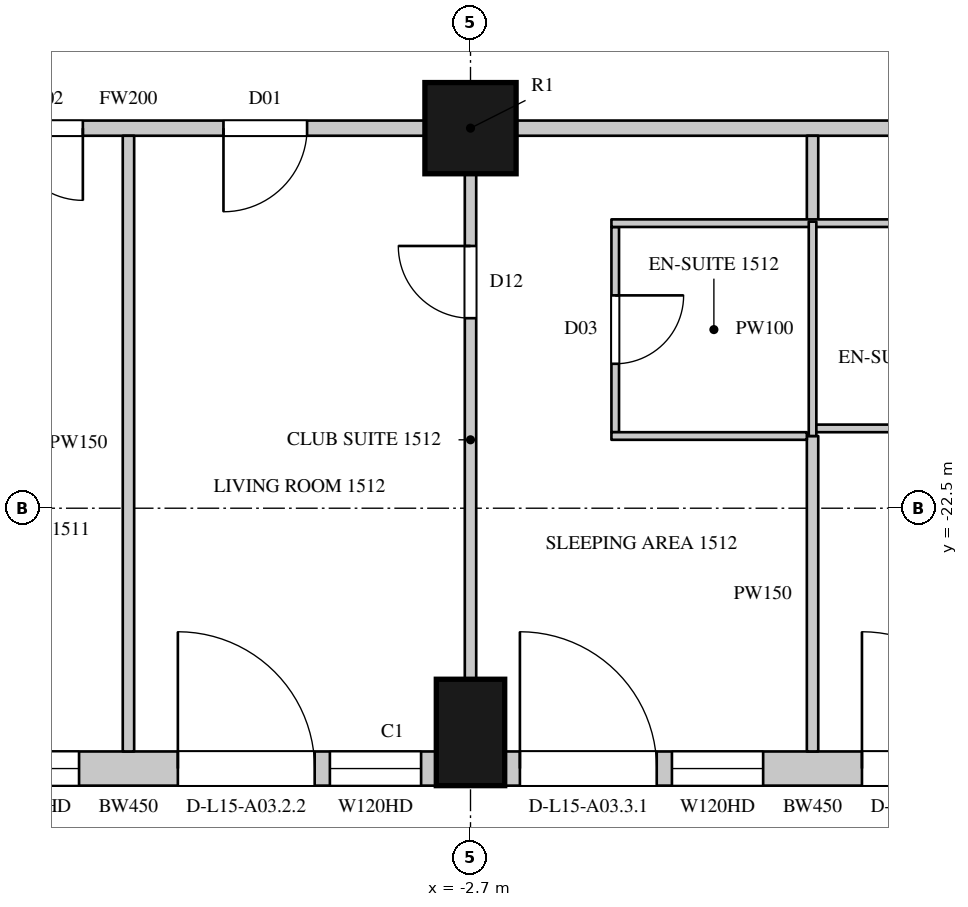
"""IFC4 building model, lengths in metres.
Left out: names, types, materials, properties, quantities, classifications, styles, units other than length and angle.
Written with IfcOpenShell. Run it as: python <this file> out.ifc"""

import sys

from ifc_helpers import new_model, si_unit, direction, frame, frame_2d, origin, origin_2d, place, context, subcontext, project, spatial, rectangle, circle, extrude, element, fill, save


model = new_model("IFC4")
c1 = context("Model", 3, precision=1e-05, world=origin(), true_north=direction((0.0, 1.0)))
c2 = subcontext(c1, "Body", "Model", "MODEL_VIEW")
j1 = project(units=[si_unit("LENGTHUNIT", "METRE"), si_unit("PLANEANGLEUNIT", "RADIAN")], contexts=[c1])
p1 = place(None, origin())
s1 = spatial("IfcSite", under=j1, at=p1, CompositionType="ELEMENT")
p2 = place(p1, origin())
s2 = spatial("IfcBuilding", under=s1, at=p2, CompositionType="ELEMENT")
p3 = place(p2, frame((0.0, 0.0, 84.3)))
s3 = spatial("IfcBuildingStorey", under=s2, at=p3, CompositionType="ELEMENT", Elevation=84.3)
p4 = place(p3, frame((-2.7, -25.45, 0.0), z_axis=(0.0, 0.0, 1.0), x_axis=(1.0, 0.0, 0.0)))
e1 = element("IfcColumn", 1, at=p4, inside=s3, PredefinedType="COLUMN", context=c2, shape_type="SweptSolid", body=[
    extrude(rectangle(XDim=0.9, YDim=1.4, at=origin_2d()), origin(), (0.0, 0.0, 1.0), 3.6),
])
p5 = place(p3, frame((-2.7, -17.5, 0.0), z_axis=(0.0, 0.0, 1.0), x_axis=(1.0, 0.0, 0.0)))
e2 = element("IfcColumn", 2, at=p5, inside=s3, PredefinedType="COLUMN", context=c2, shape_type="SweptSolid", body=[
    extrude(circle(Radius=0.6, at=origin_2d()), origin(), (0.0, 0.0, 1.0), 3.6),
])
p6 = place(p3, frame((-11.25, -25.925, 0.0), z_axis=(0.0, 0.0, 1.0), x_axis=(1.0, 0.0, 0.0)))
e3 = element("IfcWall", 3, at=p6, inside=s3, PredefinedType="SOLIDWALL", context=c2, shape_type="SweptSolid", body=[
    extrude(rectangle(XDim=8.1, YDim=0.45, at=frame_2d((4.05, 0.0))), origin(), (0.0, 0.0, 1.0), 3.3),
])
p7 = place(p6, frame((0.2, 0.0, 0.0)))
e4 = element("IfcOpeningElement", 4, at=p7, cuts=e3, PredefinedType="OPENING", context=c2, shape_type="SweptSolid", body=[
    extrude(rectangle(XDim=1.8, YDim=2.4, at=frame_2d((0.9, 1.2))), frame((0.0, 0.235, 0.0), z_axis=(0.0, -1.0, 0.0), x_axis=(1.0, 0.0, 0.0)), (0.0, 0.0, 1.0), 0.47),
])
p8 = place(p6, frame((2.2, 0.0, 1.05)))
e5 = element("IfcOpeningElement", 5, at=p8, cuts=e3, PredefinedType="OPENING", context=c2, shape_type="SweptSolid", body=[
    extrude(rectangle(XDim=1.2, YDim=2.0, at=frame_2d((0.6, 1.0))), frame((0.0, 0.235, 0.0), z_axis=(0.0, -1.0, 0.0), x_axis=(1.0, 0.0, 0.0)), (0.0, 0.0, 1.0), 0.47),
])
p9 = place(p6, frame((4.7, 0.0, 0.0)))
e6 = element("IfcOpeningElement", 6, at=p9, cuts=e3, PredefinedType="OPENING", context=c2, shape_type="SweptSolid", body=[
    extrude(rectangle(XDim=1.8, YDim=2.4, at=frame_2d((0.9, 1.2))), frame((0.0, 0.235, 0.0), z_axis=(0.0, -1.0, 0.0), x_axis=(1.0, 0.0, 0.0)), (0.0, 0.0, 1.0), 0.47),
])
p10 = place(p6, frame((6.7, 0.0, 1.05)))
e7 = element("IfcOpeningElement", 7, at=p10, cuts=e3, PredefinedType="OPENING", context=c2, shape_type="SweptSolid", body=[
    extrude(rectangle(XDim=1.2, YDim=2.0, at=frame_2d((0.6, 1.0))), frame((0.0, 0.235, 0.0), z_axis=(0.0, -1.0, 0.0), x_axis=(1.0, 0.0, 0.0)), (0.0, 0.0, 1.0), 0.47),
])
p11 = place(p3, frame((-2.25, -25.925, 0.0), z_axis=(0.0, 0.0, 1.0), x_axis=(1.0, 0.0, 0.0)))
e8 = element("IfcWall", 8, at=p11, inside=s3, PredefinedType="SOLIDWALL", context=c2, shape_type="SweptSolid", body=[
    extrude(rectangle(XDim=8.1, YDim=0.45, at=frame_2d((4.05, 0.0))), origin(), (0.0, 0.0, 1.0), 3.3),
])
p12 = place(p11, frame((0.2, 0.0, 0.0)))
e9 = element("IfcOpeningElement", 9, at=p12, cuts=e8, PredefinedType="OPENING", context=c2, shape_type="SweptSolid", body=[
    extrude(rectangle(XDim=1.8, YDim=2.4, at=frame_2d((0.9, 1.2))), frame((0.0, 0.235, 0.0), z_axis=(0.0, -1.0, 0.0), x_axis=(1.0, 0.0, 0.0)), (0.0, 0.0, 1.0), 0.47),
])
p13 = place(p11, frame((2.2, 0.0, 1.05)))
e10 = element("IfcOpeningElement", 10, at=p13, cuts=e8, PredefinedType="OPENING", context=c2, shape_type="SweptSolid", body=[
    extrude(rectangle(XDim=1.2, YDim=2.0, at=frame_2d((0.6, 1.0))), frame((0.0, 0.235, 0.0), z_axis=(0.0, -1.0, 0.0), x_axis=(1.0, 0.0, 0.0)), (0.0, 0.0, 1.0), 0.47),
])
p14 = place(p11, frame((4.7, 0.0, 0.0)))
e11 = element("IfcOpeningElement", 11, at=p14, cuts=e8, PredefinedType="OPENING", context=c2, shape_type="SweptSolid", body=[
    extrude(rectangle(XDim=1.8, YDim=2.4, at=frame_2d((0.9, 1.2))), frame((0.0, 0.235, 0.0), z_axis=(0.0, -1.0, 0.0), x_axis=(1.0, 0.0, 0.0)), (0.0, 0.0, 1.0), 0.47),
])
p15 = place(p11, frame((6.7, 0.0, 1.05)))
e12 = element("IfcOpeningElement", 12, at=p15, cuts=e8, PredefinedType="OPENING", context=c2, shape_type="SweptSolid", body=[
    extrude(rectangle(XDim=1.2, YDim=2.0, at=frame_2d((0.6, 1.0))), frame((0.0, 0.235, 0.0), z_axis=(0.0, -1.0, 0.0), x_axis=(1.0, 0.0, 0.0)), (0.0, 0.0, 1.0), 0.47),
])
p16 = place(p3, frame((-11.1, -17.5, 0.0), z_axis=(0.0, 0.0, 1.0), x_axis=(1.0, 0.0, 0.0)))
e13 = element("IfcWall", 13, at=p16, inside=s3, PredefinedType="PARTITIONING", context=c2, shape_type="SweptSolid", body=[
    extrude(rectangle(XDim=7.8, YDim=0.2, at=frame_2d((3.9, 0.0))), origin(), (0.0, 0.0, 1.0), 2.75),
])
p17 = place(p16, frame((2.35, 0.0, 0.0)))
e14 = element("IfcOpeningElement", 14, at=p17, cuts=e13, PredefinedType="OPENING", context=c2, shape_type="SweptSolid", body=[
    extrude(rectangle(XDim=0.95, YDim=2.2, at=frame_2d((0.475, 1.1))), frame((0.0, 0.11, 0.0), z_axis=(0.0, -1.0, 0.0), x_axis=(1.0, 0.0, 0.0)), (0.0, 0.0, 1.0), 0.22),
])
p18 = place(p16, frame((5.15, 0.0, 0.0)))
e15 = element("IfcOpeningElement", 15, at=p18, cuts=e13, PredefinedType="OPENING", context=c2, shape_type="SweptSolid", body=[
    extrude(rectangle(XDim=1.1, YDim=2.4, at=frame_2d((0.55, 1.2))), frame((0.0, 0.11, 0.0), z_axis=(0.0, -1.0, 0.0), x_axis=(1.0, 0.0, 0.0)), (0.0, 0.0, 1.0), 0.22),
])
p19 = place(p3, frame((-2.1, -17.5, 0.0), z_axis=(0.0, 0.0, 1.0), x_axis=(1.0, 0.0, 0.0)))
e16 = element("IfcWall", 16, at=p19, inside=s3, PredefinedType="PARTITIONING", context=c2, shape_type="SweptSolid", body=[
    extrude(rectangle(XDim=7.8, YDim=0.2, at=frame_2d((3.9, 0.0))), origin(), (0.0, 0.0, 1.0), 2.75),
])
p20 = place(p19, frame((6.55, 0.0, 0.0)))
e17 = element("IfcOpeningElement", 17, at=p20, cuts=e16, PredefinedType="OPENING", context=c2, shape_type="SweptSolid", body=[
    extrude(rectangle(XDim=0.95, YDim=2.2, at=frame_2d((0.475, 1.1))), frame((0.0, 0.11, 0.0), z_axis=(0.0, -1.0, 0.0), x_axis=(1.0, 0.0, 0.0)), (0.0, 0.0, 1.0), 0.22),
])
p21 = place(p3, frame((-7.2, -25.7, 0.0), z_axis=(0.0, 0.0, 1.0), x_axis=(0.0, 1.0, 0.0)))
e18 = element("IfcWall", 18, at=p21, inside=s3, PredefinedType="PARTITIONING", context=c2, shape_type="SweptSolid", body=[
    extrude(rectangle(XDim=8.1, YDim=0.15, at=frame_2d((4.05, 0.0))), origin(), (0.0, 0.0, 1.0), 2.65),
])
p22 = place(p3, frame((-2.7, -24.75, 0.0), z_axis=(0.0, 0.0, 1.0), x_axis=(0.0, 1.0, 0.0)))
e19 = element("IfcWall", 19, at=p22, inside=s3, PredefinedType="PARTITIONING", context=c2, shape_type="SweptSolid", body=[
    extrude(rectangle(XDim=6.65, YDim=0.15, at=frame_2d((3.325, 0.0))), origin(), (0.0, 0.0, 1.0), 2.75),
])
p23 = place(p22, frame((4.75, 0.0, 0.0)))
e20 = element("IfcOpeningElement", 20, at=p23, cuts=e19, PredefinedType="OPENING", context=c2, shape_type="SweptSolid", body=[
    extrude(rectangle(XDim=0.95, YDim=2.2, at=frame_2d((0.475, 1.1))), frame((0.0, 0.085, 0.0), z_axis=(0.0, -1.0, 0.0), x_axis=(1.0, 0.0, 0.0)), (0.0, 0.0, 1.0), 0.17),
])
p24 = place(p3, frame((1.8, -25.7, 0.0), z_axis=(0.0, 0.0, 1.0), x_axis=(0.0, 1.0, 0.0)))
e21 = element("IfcWall", 21, at=p24, inside=s3, PredefinedType="PARTITIONING", context=c2, shape_type="SweptSolid", body=[
    extrude(rectangle(XDim=4.15, YDim=0.15, at=frame_2d((2.075, 0.0))), origin(), (0.0, 0.0, 1.0), 2.65),
])
p25 = place(p3, frame((1.8, -18.73, 0.0), z_axis=(0.0, 0.0, 1.0), x_axis=(0.0, 1.0, 0.0)))
e22 = element("IfcWall", 22, at=p25, inside=s3, PredefinedType="PARTITIONING", context=c2, shape_type="SweptSolid", body=[
    extrude(rectangle(XDim=1.13, YDim=0.15, at=frame_2d((0.565, 0.0))), origin(), (0.0, 0.0, 1.0), 2.65),
])
p26 = place(p3, frame((-0.796, -21.5, 0.0), z_axis=(0.0, 0.0, 1.0), x_axis=(0.0, 1.0, 0.0)))
e23 = element("IfcWall", 23, at=p26, inside=s3, PredefinedType="PARTITIONING", context=c2, shape_type="SweptSolid", body=[
    extrude(rectangle(XDim=2.7, YDim=0.1, at=frame_2d((1.35, 0.0))), origin(), (0.0, 0.0, 1.0), 3.3),
])
p27 = place(p26, frame((0.9, 0.0, 0.0)))
e24 = element("IfcOpeningElement", 24, at=p27, cuts=e23, PredefinedType="OPENING", context=c2, shape_type="SweptSolid", body=[
    extrude(rectangle(XDim=0.9, YDim=2.2, at=frame_2d((0.45, 1.1))), frame((0.0, 0.06, 0.0), z_axis=(0.0, -1.0, 0.0), x_axis=(1.0, 0.0, 0.0)), (0.0, 0.0, 1.0), 0.12),
])
p28 = place(p3, frame((-0.846, -21.55, 0.0), z_axis=(0.0, 0.0, 1.0), x_axis=(1.0, 0.0, 0.0)))
e25 = element("IfcWall", 25, at=p28, inside=s3, PredefinedType="PARTITIONING", context=c2, shape_type="SweptSolid", body=[
    extrude(rectangle(XDim=2.571, YDim=0.1, at=frame_2d((1.286, 0.0))), origin(), (0.0, 0.0, 1.0), 3.3),
])
p29 = place(p3, frame((-0.846, -18.75, 0.0), z_axis=(0.0, 0.0, 1.0), x_axis=(1.0, 0.0, 0.0)))
e26 = element("IfcWall", 26, at=p29, inside=s3, PredefinedType="PARTITIONING", context=c2, shape_type="SweptSolid", body=[
    extrude(rectangle(XDim=5.092, YDim=0.1, at=frame_2d((2.546, 0.0))), origin(), (0.0, 0.0, 1.0), 3.3),
])
p30 = place(p29, frame((3.95, 0.0, 0.0)))
e27 = element("IfcOpeningElement", 27, at=p30, cuts=e26, PredefinedType="OPENING", context=c2, shape_type="SweptSolid", body=[
    extrude(rectangle(XDim=0.9, YDim=2.2, at=frame_2d((0.45, 1.1))), frame((0.0, 0.06, 0.0), z_axis=(0.0, -1.0, 0.0), x_axis=(1.0, 0.0, 0.0)), (0.0, 0.0, 1.0), 0.12),
])
p31 = place(p3, frame((1.8, -21.55, 0.0), z_axis=(0.0, 0.0, 1.0), x_axis=(0.0, 1.0, 0.0)))
e28 = element("IfcWall", 28, at=p31, inside=s3, PredefinedType="PARTITIONING", context=c2, shape_type="SweptSolid", body=[
    extrude(rectangle(XDim=2.82, YDim=0.1, at=frame_2d((1.41, 0.0))), origin(), (0.0, 0.0, 1.0), 2.65),
])
p32 = place(p3, frame((1.85, -21.45, 0.0), z_axis=(0.0, 0.0, 1.0), x_axis=(1.0, 0.0, 0.0)))
e29 = element("IfcWall", 29, at=p32, inside=s3, PredefinedType="PARTITIONING", context=c2, shape_type="SweptSolid", body=[
    extrude(rectangle(XDim=2.396, YDim=0.1, at=frame_2d((1.198, 0.0))), origin(), (0.0, 0.0, 1.0), 3.3),
])
p33 = place(p8, origin())
e30 = element("IfcWindow", 30, at=p33, inside=s3, PartitioningType="SINGLE_PANEL", PredefinedType="WINDOW", context=c2, shape_type="SweptSolid", body=[
    extrude(rectangle(XDim=1.2, YDim=2.0, at=frame_2d((0.6, 1.0))), frame((0.0, 0.135, 0.0), z_axis=(0.0, -1.0, 0.0), x_axis=(1.0, 0.0, 0.0)), (0.0, 0.0, 1.0), 0.06),
])
fill(e5, e30)
p34 = place(p9, origin())
e31 = element("IfcDoor", 31, at=p34, inside=s3, OperationType="SLIDING_TO_LEFT", PredefinedType="DOOR", context=c2, shape_type="SweptSolid", body=[
    extrude(rectangle(XDim=1.8, YDim=2.4, at=frame_2d((0.9, 1.2))), frame((0.0, 0.13, 0.0), z_axis=(0.0, -1.0, 0.0), x_axis=(1.0, 0.0, 0.0)), (0.0, 0.0, 1.0), 0.05),
])
fill(e6, e31)
p35 = place(p10, origin())
e32 = element("IfcWindow", 32, at=p35, inside=s3, PartitioningType="SINGLE_PANEL", PredefinedType="WINDOW", context=c2, shape_type="SweptSolid", body=[
    extrude(rectangle(XDim=1.2, YDim=2.0, at=frame_2d((0.6, 1.0))), frame((0.0, 0.135, 0.0), z_axis=(0.0, -1.0, 0.0), x_axis=(1.0, 0.0, 0.0)), (0.0, 0.0, 1.0), 0.06),
])
fill(e7, e32)
p36 = place(p12, origin())
e33 = element("IfcDoor", 33, at=p36, inside=s3, OperationType="SLIDING_TO_LEFT", PredefinedType="DOOR", context=c2, shape_type="SweptSolid", body=[
    extrude(rectangle(XDim=1.8, YDim=2.4, at=frame_2d((0.9, 1.2))), frame((0.0, 0.13, 0.0), z_axis=(0.0, -1.0, 0.0), x_axis=(1.0, 0.0, 0.0)), (0.0, 0.0, 1.0), 0.05),
])
fill(e9, e33)
p37 = place(p13, origin())
e34 = element("IfcWindow", 34, at=p37, inside=s3, PartitioningType="SINGLE_PANEL", PredefinedType="WINDOW", context=c2, shape_type="SweptSolid", body=[
    extrude(rectangle(XDim=1.2, YDim=2.0, at=frame_2d((0.6, 1.0))), frame((0.0, 0.135, 0.0), z_axis=(0.0, -1.0, 0.0), x_axis=(1.0, 0.0, 0.0)), (0.0, 0.0, 1.0), 0.06),
])
fill(e10, e34)
p38 = place(p14, origin())
e35 = element("IfcDoor", 35, at=p38, inside=s3, OperationType="SLIDING_TO_LEFT", PredefinedType="DOOR", context=c2, shape_type="SweptSolid", body=[
    extrude(rectangle(XDim=1.8, YDim=2.4, at=frame_2d((0.9, 1.2))), frame((0.0, 0.13, 0.0), z_axis=(0.0, -1.0, 0.0), x_axis=(1.0, 0.0, 0.0)), (0.0, 0.0, 1.0), 0.05),
])
fill(e11, e35)
p39 = place(p17, origin())
e36 = element("IfcDoor", 36, at=p39, inside=s3, OperationType="SINGLE_SWING_LEFT", PredefinedType="DOOR", context=c2, shape_type="SweptSolid", body=[
    extrude(rectangle(XDim=0.95, YDim=2.2, at=frame_2d((0.475, 1.1))), frame((0.0, 0.025, 0.0), z_axis=(0.0, -1.0, 0.0), x_axis=(1.0, 0.0, 0.0)), (0.0, 0.0, 1.0), 0.05),
])
fill(e14, e36)
p40 = place(p18, origin())
e37 = element("IfcDoor", 37, at=p40, inside=s3, OperationType="SINGLE_SWING_RIGHT", PredefinedType="DOOR", context=c2, shape_type="SweptSolid", body=[
    extrude(rectangle(XDim=1.1, YDim=2.4, at=frame_2d((0.55, 1.2))), frame((0.0, 0.025, 0.0), z_axis=(0.0, -1.0, 0.0), x_axis=(1.0, 0.0, 0.0)), (0.0, 0.0, 1.0), 0.05),
])
fill(e15, e37)
p41 = place(p23, origin())
e38 = element("IfcDoor", 38, at=p41, inside=s3, OperationType="SINGLE_SWING_RIGHT", PredefinedType="DOOR", context=c2, shape_type="SweptSolid", body=[
    extrude(rectangle(XDim=0.95, YDim=2.2, at=frame_2d((0.475, 1.1))), frame((0.0, 0.025, 0.0), z_axis=(0.0, -1.0, 0.0), x_axis=(1.0, 0.0, 0.0)), (0.0, 0.0, 1.0), 0.05),
])
fill(e20, e38)
p42 = place(p27, origin())
e39 = element("IfcDoor", 39, at=p42, inside=s3, OperationType="SINGLE_SWING_LEFT", PredefinedType="DOOR", context=c2, shape_type="SweptSolid", body=[
    extrude(rectangle(XDim=0.9, YDim=2.2, at=frame_2d((0.45, 1.1))), frame((0.0, 0.025, 0.0), z_axis=(0.0, -1.0, 0.0), x_axis=(1.0, 0.0, 0.0)), (0.0, 0.0, 1.0), 0.05),
])
fill(e24, e39)
save(model, sys.argv[1])
